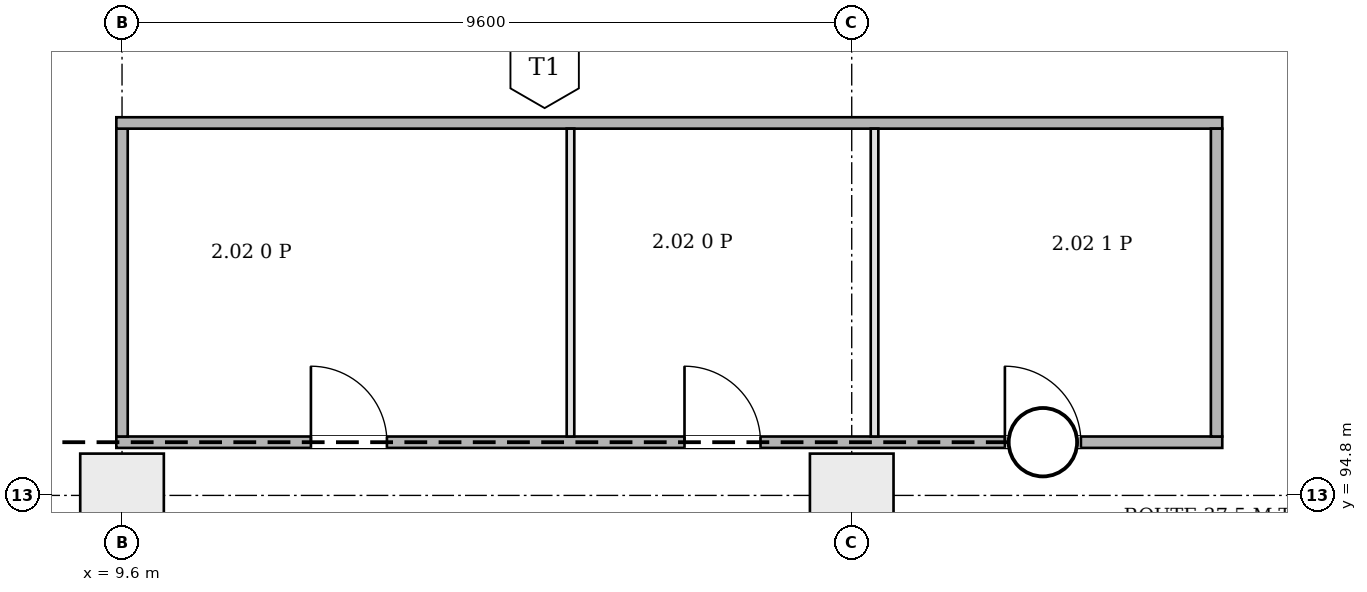
"""IFC4 building model, lengths in metres.
Left out: names, types, materials, properties, quantities, classifications, styles, units other than length and angle.
Written with IfcOpenShell. Run it as: python <this file> out.ifc"""

import sys

from ifc_helpers import new_model, si_unit, direction, frame, frame_2d, origin, origin_2d, place, context, subcontext, project, spatial, rectangle, extrude, element, fill, save


model = new_model("IFC4")
c1 = context("Model", 3, precision=1e-05, world=origin(), true_north=direction((0.0, 1.0)))
c2 = subcontext(c1, "Body", "Model", "MODEL_VIEW")
j1 = project(units=[si_unit("LENGTHUNIT", "METRE"), si_unit("PLANEANGLEUNIT", "RADIAN")], contexts=[c1])
p1 = place(None, origin())
s1 = spatial("IfcSite", under=j1, at=p1, CompositionType="ELEMENT")
p2 = place(p1, origin())
s2 = spatial("IfcBuilding", under=s1, at=p2, CompositionType="ELEMENT")
p3 = place(p2, frame((0.0, 0.0, 14.2)))
s3 = spatial("IfcBuildingStorey", under=s2, at=p3, CompositionType="ELEMENT", Elevation=14.2)
for number, where, z_axis, x_axis in (
    (1, (9.6, 94.8, 0.0), (0.0, 0.0, 1.0), (1.0, 0.0, 0.0)),
    (2, (19.2, 94.8, 0.0), (0.0, 0.0, 1.0), (1.0, 0.0, 0.0)),
):
    element("IfcColumn", number, at=place(p3, frame(where, z_axis=z_axis, x_axis=x_axis)), inside=s3, PredefinedType="COLUMN", context=c2, shape_type="SweptSolid", body=[
        extrude(rectangle(XDim=1.1, YDim=1.1, at=origin_2d()), origin(), (0.0, 0.0, 1.0), 7.5),
    ])
p4 = place(p3, frame((9.525, 95.5, 0.0), z_axis=(0.0, 0.0, 1.0), x_axis=(1.0, 0.0, 0.0)))
e3 = element("IfcWall", 3, at=p4, inside=s3, PredefinedType="PARTITIONING", context=c2, shape_type="SweptSolid", body=[
    extrude(rectangle(XDim=14.55, YDim=0.15, at=frame_2d((7.275, 0.0))), origin(), (0.0, 0.0, 1.0), 7.15),
])
p5 = place(p4, frame((2.56, 0.0, 0.0)))
e4 = element("IfcOpeningElement", 4, at=p5, cuts=e3, PredefinedType="OPENING", context=c2, shape_type="SweptSolid", body=[
    extrude(rectangle(XDim=1.0, YDim=2.1, at=frame_2d((0.5, 1.05))), frame((0.0, 0.085, 0.0), z_axis=(0.0, -1.0, 0.0), x_axis=(1.0, 0.0, 0.0)), (0.0, 0.0, 1.0), 0.17),
])
p6 = place(p4, frame((7.475, 0.0, 0.0)))
e5 = element("IfcOpeningElement", 5, at=p6, cuts=e3, PredefinedType="OPENING", context=c2, shape_type="SweptSolid", body=[
    extrude(rectangle(XDim=1.0, YDim=2.1, at=frame_2d((0.5, 1.05))), frame((0.0, 0.085, 0.0), z_axis=(0.0, -1.0, 0.0), x_axis=(1.0, 0.0, 0.0)), (0.0, 0.0, 1.0), 0.17),
])
p7 = place(p4, frame((11.69, 0.0, 0.0)))
e6 = element("IfcOpeningElement", 6, at=p7, cuts=e3, PredefinedType="OPENING", context=c2, shape_type="SweptSolid", body=[
    extrude(rectangle(XDim=1.0, YDim=2.1, at=frame_2d((0.5, 1.05))), frame((0.0, 0.085, 0.0), z_axis=(0.0, -1.0, 0.0), x_axis=(1.0, 0.0, 0.0)), (0.0, 0.0, 1.0), 0.17),
])
p8 = place(p3, frame((9.6, 95.575, 0.0), z_axis=(0.0, 0.0, 1.0), x_axis=(0.0, 1.0, 0.0)))
e7 = element("IfcWall", 7, at=p8, inside=s3, PredefinedType="PARTITIONING", context=c2, shape_type="SweptSolid", body=[
    extrude(rectangle(XDim=4.05, YDim=0.15, at=frame_2d((2.025, 0.0))), origin(), (0.0, 0.0, 1.0), 6.75),
])
p9 = place(p3, frame((9.525, 99.7, 0.0), z_axis=(0.0, 0.0, 1.0), x_axis=(1.0, 0.0, 0.0)))
e8 = element("IfcWall", 8, at=p9, inside=s3, PredefinedType="PARTITIONING", context=c2, shape_type="SweptSolid", body=[
    extrude(rectangle(XDim=14.55, YDim=0.15, at=frame_2d((7.275, 0.0))), origin(), (0.0, 0.0, 1.0), 7.15),
])
for number, where, z_axis, x_axis in (
    (9, (15.5, 95.575, 0.0), (0.0, 0.0, 1.0), (0.0, 1.0, 0.0)),
    (10, (19.5, 95.575, 0.0), (0.0, 0.0, 1.0), (0.0, 1.0, 0.0)),
):
    element("IfcWall", number, at=place(p3, frame(where, z_axis=z_axis, x_axis=x_axis)), inside=s3, PredefinedType="PARTITIONING", context=c2, shape_type="SweptSolid", body=[
        extrude(rectangle(XDim=4.05, YDim=0.1, at=frame_2d((2.025, 0.0))), origin(), (0.0, 0.0, 1.0), 7.15),
    ])
p10 = place(p3, frame((24.0, 95.575, 0.0), z_axis=(0.0, 0.0, 1.0), x_axis=(0.0, 1.0, 0.0)))
e11 = element("IfcWall", 11, at=p10, inside=s3, PredefinedType="PARTITIONING", context=c2, shape_type="SweptSolid", body=[
    extrude(rectangle(XDim=4.05, YDim=0.15, at=frame_2d((2.025, 0.0))), origin(), (0.0, 0.0, 1.0), 7.15),
])
p11 = place(p5, origin())
e12 = element("IfcDoor", 12, at=p11, inside=s3, OperationType="SINGLE_SWING_LEFT", PredefinedType="DOOR", context=c2, shape_type="SweptSolid", body=[
    extrude(rectangle(XDim=1.0, YDim=2.1, at=frame_2d((0.5, 1.05))), frame((0.0, 0.025, 0.0), z_axis=(0.0, -1.0, 0.0), x_axis=(1.0, 0.0, 0.0)), (0.0, 0.0, 1.0), 0.05),
])
fill(e4, e12)
p12 = place(p6, origin())
e13 = element("IfcDoor", 13, at=p12, inside=s3, OperationType="SINGLE_SWING_RIGHT", PredefinedType="DOOR", context=c2, shape_type="SweptSolid", body=[
    extrude(rectangle(XDim=1.0, YDim=2.1, at=frame_2d((0.5, 1.05))), frame((0.0, 0.025, 0.0), z_axis=(0.0, -1.0, 0.0), x_axis=(1.0, 0.0, 0.0)), (0.0, 0.0, 1.0), 0.05),
])
fill(e5, e13)
p13 = place(p7, origin())
e14 = element("IfcDoor", 14, at=p13, inside=s3, OperationType="SINGLE_SWING_RIGHT", PredefinedType="DOOR", context=c2, shape_type="SweptSolid", body=[
    extrude(rectangle(XDim=1.0, YDim=2.1, at=frame_2d((0.5, 1.05))), frame((0.0, 0.025, 0.0), z_axis=(0.0, -1.0, 0.0), x_axis=(1.0, 0.0, 0.0)), (0.0, 0.0, 1.0), 0.05),
])
fill(e6, e14)
save(model, sys.argv[1])
